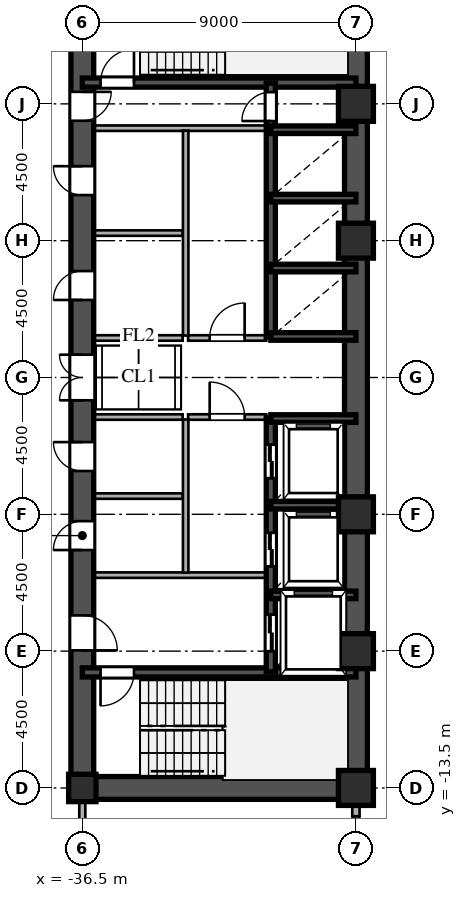
"""IFC4 building model, lengths in metres.
Left out: names, types, materials, properties, quantities, classifications, styles, units other than length and angle.
Written with IfcOpenShell. Run it as: python <this file> out.ifc"""

import sys

from ifc_helpers import new_model, si_unit, direction, frame, frame_2d, origin, origin_2d, place, context, subcontext, project, spatial, rectangle, hollow_rectangle, i_section, extrude, source, transform, mapped, element, fill, save


model = new_model("IFC4")
c1 = context("Model", 3, precision=1e-05, world=origin(), true_north=direction((0.0, 1.0)))
c2 = subcontext(c1, "Body", "Model", "MODEL_VIEW")
j1 = project(units=[si_unit("LENGTHUNIT", "METRE"), si_unit("PLANEANGLEUNIT", "RADIAN")], contexts=[c1])
p1 = place(None, origin())
s1 = spatial("IfcSite", under=j1, at=p1, CompositionType="ELEMENT")
p2 = place(p1, origin())
s2 = spatial("IfcBuilding", under=s1, at=p2, CompositionType="ELEMENT")
p3 = place(p2, frame((0.0, 0.0, 26.1)))
s3 = spatial("IfcBuildingStorey", under=s2, at=p3, CompositionType="ELEMENT", Elevation=26.1)
m1 = source(origin(), c2, "Body", "SweptSolid", [
    extrude(hollow_rectangle(XDim=1.15, YDim=1.15, WallThickness=0.048, at=origin_2d()), origin(), (0.0, 0.0, 1.0), 3.6),
])
for number, where, z_axis, x_axis in (
    (1, (-27.5, -13.5, 0.0), (0.0, 0.0, 1.0), (1.0, 0.0, 0.0)),
    (2, (-27.5, -9.0, 0.0), (0.0, 0.0, 1.0), (1.0, 0.0, 0.0)),
    (3, (-27.5, -4.5, 0.0), (0.0, 0.0, 1.0), (1.0, 0.0, 0.0)),
    (4, (-27.5, 4.5, 0.0), (0.0, 0.0, 1.0), (1.0, 0.0, 0.0)),
    (5, (-27.5, 9.0, 0.0), (0.0, 0.0, 1.0), (1.0, 0.0, 0.0)),
):
    element("IfcColumn", number, at=place(p3, frame(where, z_axis=z_axis, x_axis=x_axis)), inside=s3, PredefinedType="COLUMN", context=c2, shape_type="MappedRepresentation", body=[
        mapped(m1, transform((0.0, 0.0, 0.0), scale=1.0)),
    ])
m2 = source(origin(), c2, "Body", "SweptSolid", [
    extrude(i_section(OverallWidth=0.9, OverallDepth=0.9, WebThickness=0.036, FlangeThickness=0.055, at=origin_2d()), origin(), (0.0, 0.0, 1.0), 3.6),
])
p4 = place(p3, frame((-36.5, -13.5, 0.0), z_axis=(0.0, 0.0, 1.0), x_axis=(1.0, 0.0, 0.0)))
e6 = element("IfcColumn", 6, at=p4, inside=s3, PredefinedType="COLUMN", context=c2, shape_type="MappedRepresentation", body=[
    mapped(m2, transform((0.0, 0.0, 0.0), scale=1.0)),
])
p5 = place(p3, frame((-27.5, -14.43, 0.0), z_axis=(0.0, 0.0, 1.0), x_axis=(0.0, 1.0, 0.0)))
e7 = element("IfcWall", 7, at=p5, inside=s3, PredefinedType="SOLIDWALL", context=c2, shape_type="SweptSolid", body=[
    extrude(rectangle(XDim=0.55, YDim=0.24, at=frame_2d((0.275, 0.0))), origin(), (0.0, 0.0, 1.0), 2.88),
])
for number, where, z_axis, x_axis in (
    (8, (-27.5, -13.5, 0.0), (0.0, 0.0, 1.0), (0.0, 1.0, 0.0)),
    (9, (-27.5, 1.3, 0.0), (0.0, 0.0, 1.0), (0.0, 1.0, 0.0)),
):
    element("IfcWall", number, at=place(p3, frame(where, z_axis=z_axis, x_axis=x_axis)), inside=s3, PredefinedType="SHEAR", context=c2, shape_type="SweptSolid", body=[
        extrude(rectangle(XDim=12.2, YDim=0.75, at=frame_2d((6.1, 0.0))), origin(), (0.0, 0.0, 1.0), 3.38),
    ])
p6 = place(p3, frame((-27.5, -1.3, 0.0), z_axis=(0.0, 0.0, 1.0), x_axis=(0.0, 1.0, 0.0)))
e10 = element("IfcWall", 10, at=p6, inside=s3, PredefinedType="SHEAR", context=c2, shape_type="SweptSolid", body=[
    extrude(rectangle(XDim=2.6, YDim=0.75, at=frame_2d((1.3, 0.0))), origin(), (0.0, 0.0, 1.0), 3.38),
])
p7 = place(p3, frame((-36.5, -13.5, 0.0), z_axis=(0.0, 0.0, 1.0), x_axis=(1.0, 0.0, 0.0)))
e11 = element("IfcWall", 11, at=p7, inside=s3, PredefinedType="SHEAR", context=c2, shape_type="SweptSolid", body=[
    extrude(rectangle(XDim=9.0, YDim=0.75, at=frame_2d((4.5, 0.0))), origin(), (0.0, 0.0, 1.0), 3.38),
])
p8 = place(p3, frame((-36.5, -13.65, 0.0), z_axis=(0.0, 0.0, 1.0), x_axis=(0.0, 1.0, 0.0)))
e12 = element("IfcWall", 12, at=p8, inside=s3, PredefinedType="SHEAR", context=c2, shape_type="SweptSolid", body=[
    extrude(rectangle(XDim=7.15, YDim=0.75, at=frame_2d((3.575, 0.0))), origin(), (0.0, 0.0, 1.0), 3.38),
])
p9 = place(p8, frame((4.675, 0.0, 0.0)))
e13 = element("IfcOpeningElement", 13, at=p9, cuts=e12, PredefinedType="OPENING", context=c2, shape_type="SweptSolid", body=[
    extrude(rectangle(XDim=1.15, YDim=2.2, at=frame_2d((0.575, 1.1))), frame((0.0, 0.385, 0.0), z_axis=(0.0, -1.0, 0.0), x_axis=(1.0, 0.0, 0.0)), (0.0, 0.0, 1.0), 0.77),
])
p10 = place(p3, frame((-36.5, -1.3, 0.0), z_axis=(0.0, 0.0, 1.0), x_axis=(0.0, 1.0, 0.0)))
e14 = element("IfcWall", 14, at=p10, inside=s3, PredefinedType="SHEAR", context=c2, shape_type="SweptSolid", body=[
    extrude(rectangle(XDim=2.6, YDim=0.75, at=frame_2d((1.3, 0.0))), origin(), (0.0, 0.0, 1.0), 3.38),
])
p11 = place(p10, frame((0.55, 0.0, 0.0)))
e15 = element("IfcOpeningElement", 15, at=p11, cuts=e14, PredefinedType="OPENING", context=c2, shape_type="SweptSolid", body=[
    extrude(rectangle(XDim=1.5, YDim=2.3, at=frame_2d((0.75, 1.15))), frame((0.0, 0.385, 0.0), z_axis=(0.0, -1.0, 0.0), x_axis=(1.0, 0.0, 0.0)), (0.0, 0.0, 1.0), 0.77),
])
p12 = place(p3, frame((-36.5, 8.2, 0.0), z_axis=(0.0, 0.0, 1.0), x_axis=(0.0, 1.0, 0.0)))
e16 = element("IfcWall", 16, at=p12, inside=s3, PredefinedType="SHEAR", context=c2, shape_type="SweptSolid", body=[
    extrude(rectangle(XDim=5.45, YDim=0.75, at=frame_2d((2.725, 0.0))), origin(), (0.0, 0.0, 1.0), 3.38),
])
p13 = place(p12, frame((0.245, 0.0, 0.0)))
e17 = element("IfcOpeningElement", 17, at=p13, cuts=e16, PredefinedType="OPENING", context=c2, shape_type="SweptSolid", body=[
    extrude(rectangle(XDim=0.95, YDim=2.15, at=frame_2d((0.475, 1.075))), frame((0.0, 0.385, 0.0), z_axis=(0.0, -1.0, 0.0), x_axis=(1.0, 0.0, 0.0)), (0.0, 0.0, 1.0), 0.77),
])
p14 = place(p3, frame((-36.5, -6.5, 0.0), z_axis=(0.0, 0.0, 1.0), x_axis=(0.0, 1.0, 0.0)))
e18 = element("IfcWall", 18, at=p14, inside=s3, PredefinedType="SHEAR", context=c2, shape_type="SweptSolid", body=[
    extrude(rectangle(XDim=2.6, YDim=0.75, at=frame_2d((1.3, 0.0))), origin(), (0.0, 0.0, 1.0), 3.38),
])
p15 = place(p14, frame((0.825, 0.0, 0.0)))
e19 = element("IfcOpeningElement", 19, at=p15, cuts=e18, PredefinedType="OPENING", context=c2, shape_type="SweptSolid", body=[
    extrude(rectangle(XDim=0.95, YDim=2.15, at=frame_2d((0.475, 1.075))), frame((0.0, 0.385, 0.0), z_axis=(0.0, -1.0, 0.0), x_axis=(1.0, 0.0, 0.0)), (0.0, 0.0, 1.0), 0.77),
])
p16 = place(p3, frame((-36.5, -3.9, 0.0), z_axis=(0.0, 0.0, 1.0), x_axis=(0.0, 1.0, 0.0)))
e20 = element("IfcWall", 20, at=p16, inside=s3, PredefinedType="SHEAR", context=c2, shape_type="SweptSolid", body=[
    extrude(rectangle(XDim=2.6, YDim=0.75, at=frame_2d((1.3, 0.0))), origin(), (0.0, 0.0, 1.0), 3.38),
])
p17 = place(p16, frame((0.825, 0.0, 0.0)))
e21 = element("IfcOpeningElement", 21, at=p17, cuts=e20, PredefinedType="OPENING", context=c2, shape_type="SweptSolid", body=[
    extrude(rectangle(XDim=0.95, YDim=2.15, at=frame_2d((0.475, 1.075))), frame((0.0, 0.385, 0.0), z_axis=(0.0, -1.0, 0.0), x_axis=(1.0, 0.0, 0.0)), (0.0, 0.0, 1.0), 0.77),
])
p18 = place(p3, frame((-36.5, 1.3, 0.0), z_axis=(0.0, 0.0, 1.0), x_axis=(0.0, 1.0, 0.0)))
e22 = element("IfcWall", 22, at=p18, inside=s3, PredefinedType="SHEAR", context=c2, shape_type="SweptSolid", body=[
    extrude(rectangle(XDim=3.45, YDim=0.75, at=frame_2d((1.725, 0.0))), origin(), (0.0, 0.0, 1.0), 3.38),
])
p19 = place(p18, frame((1.25, 0.0, 0.0)))
e23 = element("IfcOpeningElement", 23, at=p19, cuts=e22, PredefinedType="OPENING", context=c2, shape_type="SweptSolid", body=[
    extrude(rectangle(XDim=0.95, YDim=2.15, at=frame_2d((0.475, 1.075))), frame((0.0, 0.385, 0.0), z_axis=(0.0, -1.0, 0.0), x_axis=(1.0, 0.0, 0.0)), (0.0, 0.0, 1.0), 0.77),
])
p20 = place(p3, frame((-36.5, 4.75, 0.0), z_axis=(0.0, 0.0, 1.0), x_axis=(0.0, 1.0, 0.0)))
e24 = element("IfcWall", 24, at=p20, inside=s3, PredefinedType="SHEAR", context=c2, shape_type="SweptSolid", body=[
    extrude(rectangle(XDim=3.45, YDim=0.75, at=frame_2d((1.725, 0.0))), origin(), (0.0, 0.0, 1.0), 3.38),
])
p21 = place(p20, frame((1.25, 0.0, 0.0)))
e25 = element("IfcOpeningElement", 25, at=p21, cuts=e24, PredefinedType="OPENING", context=c2, shape_type="SweptSolid", body=[
    extrude(rectangle(XDim=0.95, YDim=2.15, at=frame_2d((0.475, 1.075))), frame((0.0, 0.385, 0.0), z_axis=(0.0, -1.0, 0.0), x_axis=(1.0, 0.0, 0.0)), (0.0, 0.0, 1.0), 0.77),
])
p22 = place(p3, frame((-36.5, -9.7, 0.0), z_axis=(0.0, 0.0, 1.0), x_axis=(1.0, 0.0, 0.0)))
e26 = element("IfcWall", 26, at=p22, inside=s3, PredefinedType="SHEAR", context=c2, shape_type="SweptSolid", body=[
    extrude(rectangle(XDim=9.0, YDim=0.3, at=frame_2d((4.5, 0.0))), origin(), (0.0, 0.0, 1.0), 3.38),
])
p23 = place(p22, frame((0.6, 0.0, 0.0)))
e27 = element("IfcOpeningElement", 27, at=p23, cuts=e26, PredefinedType="OPENING", context=c2, shape_type="SweptSolid", body=[
    extrude(rectangle(XDim=1.1, YDim=2.2, at=frame_2d((0.55, 1.1))), frame((0.0, 0.16, 0.0), z_axis=(0.0, -1.0, 0.0), x_axis=(1.0, 0.0, 0.0)), (0.0, 0.0, 1.0), 0.32),
])
p24 = place(p3, frame((-36.5, 9.7, 0.0), z_axis=(0.0, 0.0, 1.0), x_axis=(1.0, 0.0, 0.0)))
e28 = element("IfcWall", 28, at=p24, inside=s3, PredefinedType="SHEAR", context=c2, shape_type="SweptSolid", body=[
    extrude(rectangle(XDim=9.0, YDim=0.3, at=frame_2d((4.5, 0.0))), origin(), (0.0, 0.0, 1.0), 3.38),
])
p25 = place(p24, frame((0.6, 0.0, 0.0)))
e29 = element("IfcOpeningElement", 29, at=p25, cuts=e28, PredefinedType="OPENING", context=c2, shape_type="SweptSolid", body=[
    extrude(rectangle(XDim=1.1, YDim=2.2, at=frame_2d((0.55, 1.1))), frame((0.0, 0.16, 0.0), z_axis=(0.0, -1.0, 0.0), x_axis=(1.0, 0.0, 0.0)), (0.0, 0.0, 1.0), 0.32),
])
for number, where, z_axis, x_axis in (
    (30, (-30.3, -7.15, 0.0), (0.0, 0.0, 1.0), (1.0, 0.0, 0.0)),
    (31, (-30.3, -4.2, 0.0), (0.0, 0.0, 1.0), (1.0, 0.0, 0.0)),
    (32, (-30.3, -1.35, 0.0), (0.0, 0.0, 1.0), (1.0, 0.0, 0.0)),
    (33, (-30.3, 1.35, 0.0), (0.0, 0.0, 1.0), (1.0, 0.0, 0.0)),
    (34, (-30.3, 3.6, 0.0), (0.0, 0.0, 1.0), (1.0, 0.0, 0.0)),
    (35, (-30.3, 5.9, 0.0), (0.0, 0.0, 1.0), (1.0, 0.0, 0.0)),
    (36, (-30.3, 8.15, 0.0), (0.0, 0.0, 1.0), (1.0, 0.0, 0.0)),
):
    element("IfcWall", number, at=place(p3, frame(where, z_axis=z_axis, x_axis=x_axis)), inside=s3, PredefinedType="SHEAR", context=c2, shape_type="SweptSolid", body=[
        extrude(rectangle(XDim=2.8, YDim=0.25, at=frame_2d((1.4, 0.0))), origin(), (0.0, 0.0, 1.0), 3.38),
    ])
p26 = place(p3, frame((-30.3, -9.68, 0.0), z_axis=(0.0, 0.0, 1.0), x_axis=(0.0, 1.0, 0.0)))
e37 = element("IfcWall", 37, at=p26, inside=s3, PredefinedType="SHEAR", context=c2, shape_type="SweptSolid", body=[
    extrude(rectangle(XDim=2.56, YDim=0.3, at=frame_2d((1.28, 0.0))), origin(), (0.0, 0.0, 1.0), 3.38),
])
p27 = place(p26, frame((0.68, 0.0, 0.0)))
e38 = element("IfcOpeningElement", 38, at=p27, cuts=e37, PredefinedType="OPENING", context=c2, shape_type="SweptSolid", body=[
    extrude(rectangle(XDim=1.2, YDim=2.25, at=frame_2d((0.6, 1.125))), frame((0.0, 0.16, 0.0), z_axis=(0.0, -1.0, 0.0), x_axis=(1.0, 0.0, 0.0)), (0.0, 0.0, 1.0), 0.32),
])
p28 = place(p3, frame((-30.3, -7.12, 0.0), z_axis=(0.0, 0.0, 1.0), x_axis=(0.0, 1.0, 0.0)))
e39 = element("IfcWall", 39, at=p28, inside=s3, PredefinedType="SHEAR", context=c2, shape_type="SweptSolid", body=[
    extrude(rectangle(XDim=2.92, YDim=0.3, at=frame_2d((1.46, 0.0))), origin(), (0.0, 0.0, 1.0), 3.38),
])
p29 = place(p28, frame((0.91, 0.0, 0.0)))
e40 = element("IfcOpeningElement", 40, at=p29, cuts=e39, PredefinedType="OPENING", context=c2, shape_type="SweptSolid", body=[
    extrude(rectangle(XDim=1.1, YDim=2.2, at=frame_2d((0.55, 1.1))), frame((0.0, 0.16, 0.0), z_axis=(0.0, -1.0, 0.0), x_axis=(1.0, 0.0, 0.0)), (0.0, 0.0, 1.0), 0.32),
])
p30 = place(p3, frame((-30.3, -4.2, 0.0), z_axis=(0.0, 0.0, 1.0), x_axis=(0.0, 1.0, 0.0)))
e41 = element("IfcWall", 41, at=p30, inside=s3, PredefinedType="SHEAR", context=c2, shape_type="SweptSolid", body=[
    extrude(rectangle(XDim=2.88, YDim=0.3, at=frame_2d((1.44, 0.0))), origin(), (0.0, 0.0, 1.0), 3.38),
])
p31 = place(p30, frame((0.89, 0.0, 0.0)))
e42 = element("IfcOpeningElement", 42, at=p31, cuts=e41, PredefinedType="OPENING", context=c2, shape_type="SweptSolid", body=[
    extrude(rectangle(XDim=1.1, YDim=2.2, at=frame_2d((0.55, 1.1))), frame((0.0, 0.16, 0.0), z_axis=(0.0, -1.0, 0.0), x_axis=(1.0, 0.0, 0.0)), (0.0, 0.0, 1.0), 0.32),
])
p32 = place(p3, frame((-30.3, 1.32, 0.0), z_axis=(0.0, 0.0, 1.0), x_axis=(0.0, 1.0, 0.0)))
e43 = element("IfcWall", 43, at=p32, inside=s3, PredefinedType="SHEAR", context=c2, shape_type="SweptSolid", body=[
    extrude(rectangle(XDim=2.28, YDim=0.3, at=frame_2d((1.14, 0.0))), origin(), (0.0, 0.0, 1.0), 3.38),
])
p33 = place(p3, frame((-30.3, 3.6, 0.0), z_axis=(0.0, 0.0, 1.0), x_axis=(0.0, 1.0, 0.0)))
e44 = element("IfcWall", 44, at=p33, inside=s3, PredefinedType="SHEAR", context=c2, shape_type="SweptSolid", body=[
    extrude(rectangle(XDim=2.3, YDim=0.3, at=frame_2d((1.15, 0.0))), origin(), (0.0, 0.0, 1.0), 3.38),
])
p34 = place(p3, frame((-30.3, 5.9, 0.0), z_axis=(0.0, 0.0, 1.0), x_axis=(0.0, 1.0, 0.0)))
e45 = element("IfcWall", 45, at=p34, inside=s3, PredefinedType="SHEAR", context=c2, shape_type="SweptSolid", body=[
    extrude(rectangle(XDim=2.25, YDim=0.3, at=frame_2d((1.125, 0.0))), origin(), (0.0, 0.0, 1.0), 3.38),
])
p35 = place(p3, frame((-30.3, 8.15, 0.0), z_axis=(0.0, 0.0, 1.0), x_axis=(0.0, 1.0, 0.0)))
e46 = element("IfcWall", 46, at=p35, inside=s3, PredefinedType="SHEAR", context=c2, shape_type="SweptSolid", body=[
    extrude(rectangle(XDim=1.53, YDim=0.3, at=frame_2d((0.765, 0.0))), origin(), (0.0, 0.0, 1.0), 3.38),
])
p36 = place(p35, frame((0.285, 0.0, 0.0)))
e47 = element("IfcOpeningElement", 47, at=p36, cuts=e46, PredefinedType="OPENING", context=c2, shape_type="SweptSolid", body=[
    extrude(rectangle(XDim=0.95, YDim=2.15, at=frame_2d((0.475, 1.075))), frame((0.0, 0.16, 0.0), z_axis=(0.0, -1.0, 0.0), x_axis=(1.0, 0.0, 0.0)), (0.0, 0.0, 1.0), 0.32),
])
for number, where, z_axis, x_axis in (
    (48, (-36.15, -6.5, 0.0), (0.0, 0.0, 1.0), (1.0, 0.0, 0.0)),
    (49, (-36.15, 8.2, 0.0), (0.0, 0.0, 1.0), (1.0, 0.0, 0.0)),
):
    element("IfcWall", number, at=place(p3, frame(where, z_axis=z_axis, x_axis=x_axis)), inside=s3, PredefinedType="PARTITIONING", context=c2, shape_type="SweptSolid", body=[
        extrude(rectangle(XDim=5.7, YDim=0.18, at=frame_2d((2.85, 0.0))), origin(), (0.0, 0.0, 1.0), 3.38),
    ])
p37 = place(p3, frame((-33.1, -6.42, 0.0), z_axis=(0.0, 0.0, 1.0), x_axis=(0.0, 1.0, 0.0)))
e50 = element("IfcWall", 50, at=p37, inside=s3, PredefinedType="PARTITIONING", context=c2, shape_type="SweptSolid", body=[
    extrude(rectangle(XDim=5.04, YDim=0.18, at=frame_2d((2.52, 0.0))), origin(), (0.0, 0.0, 1.0), 3.38),
])
p38 = place(p3, frame((-33.1, 1.38, 0.0), z_axis=(0.0, 0.0, 1.0), x_axis=(0.0, 1.0, 0.0)))
e51 = element("IfcWall", 51, at=p38, inside=s3, PredefinedType="PARTITIONING", context=c2, shape_type="SweptSolid", body=[
    extrude(rectangle(XDim=6.74, YDim=0.18, at=frame_2d((3.37, 0.0))), origin(), (0.0, 0.0, 1.0), 3.38),
])
p39 = place(p3, frame((-33.02, -1.3, 0.0), z_axis=(0.0, 0.0, 1.0), x_axis=(1.0, 0.0, 0.0)))
e52 = element("IfcWall", 52, at=p39, inside=s3, PredefinedType="PARTITIONING", context=c2, shape_type="SweptSolid", body=[
    extrude(rectangle(XDim=2.57, YDim=0.18, at=frame_2d((1.285, 0.0))), origin(), (0.0, 0.0, 1.0), 3.38),
])
p40 = place(p39, frame((0.71, 0.0, 0.0)))
e53 = element("IfcOpeningElement", 53, at=p40, cuts=e52, PredefinedType="OPENING", context=c2, shape_type="SweptSolid", body=[
    extrude(rectangle(XDim=1.15, YDim=2.2, at=frame_2d((0.575, 1.1))), frame((0.0, 0.1, 0.0), z_axis=(0.0, -1.0, 0.0), x_axis=(1.0, 0.0, 0.0)), (0.0, 0.0, 1.0), 0.2),
])
p41 = place(p3, frame((-33.02, 1.3, 0.0), z_axis=(0.0, 0.0, 1.0), x_axis=(1.0, 0.0, 0.0)))
e54 = element("IfcWall", 54, at=p41, inside=s3, PredefinedType="PARTITIONING", context=c2, shape_type="SweptSolid", body=[
    extrude(rectangle(XDim=2.57, YDim=0.18, at=frame_2d((1.285, 0.0))), origin(), (0.0, 0.0, 1.0), 3.38),
])
p42 = place(p41, frame((0.71, 0.0, 0.0)))
e55 = element("IfcOpeningElement", 55, at=p42, cuts=e54, PredefinedType="OPENING", context=c2, shape_type="SweptSolid", body=[
    extrude(rectangle(XDim=1.15, YDim=2.2, at=frame_2d((0.575, 1.1))), frame((0.0, 0.1, 0.0), z_axis=(0.0, -1.0, 0.0), x_axis=(1.0, 0.0, 0.0)), (0.0, 0.0, 1.0), 0.2),
])
for number, where, z_axis, x_axis in (
    (56, (-36.15, -1.3, 0.0), (0.0, 0.0, 1.0), (1.0, 0.0, 0.0)),
    (57, (-36.15, 1.3, 0.0), (0.0, 0.0, 1.0), (1.0, 0.0, 0.0)),
    (58, (-36.15, -3.9, 0.0), (0.0, 0.0, 1.0), (1.0, 0.0, 0.0)),
    (59, (-36.15, 4.75, 0.0), (0.0, 0.0, 1.0), (1.0, 0.0, 0.0)),
):
    element("IfcWall", number, at=place(p3, frame(where, z_axis=z_axis, x_axis=x_axis)), inside=s3, PredefinedType="PARTITIONING", context=c2, shape_type="SweptSolid", body=[
        extrude(rectangle(XDim=2.95, YDim=0.18, at=frame_2d((1.475, 0.0))), origin(), (0.0, 0.0, 1.0), 3.38),
    ])
p43 = place(p3, frame((-36.5, -15.515, 0.0), z_axis=(0.0, 0.0, 1.0), x_axis=(0.0, 1.0, 0.0)))
e60 = element("IfcWall", 60, at=p43, inside=s3, PredefinedType="PARTITIONING", context=c2, shape_type="SweptSolid", body=[
    extrude(rectangle(XDim=1.635, YDim=0.2, at=frame_2d((0.817, 0.0))), origin(), (0.0, 0.0, 1.0), 2.68),
])
m3 = source(origin(), c2, "Body", "SweptSolid", [
    extrude(rectangle(XDim=1.15, YDim=2.2, at=frame_2d((0.575, 1.1))), frame((0.0, 0.025, 0.0), z_axis=(0.0, -1.0, 0.0), x_axis=(1.0, 0.0, 0.0)), (0.0, 0.0, 1.0), 0.05),
])
p44 = place(p9, frame((1.15, 0.0, 0.0), z_axis=(0.0, 0.0, 1.0), x_axis=(-1.0, 0.0, 0.0)))
e61 = element("IfcDoor", 61, at=p44, inside=s3, OperationType="SINGLE_SWING_LEFT", PredefinedType="DOOR", context=c2, shape_type="MappedRepresentation", body=[
    mapped(m3, transform((0.0, 0.0, 0.0), scale=1.0)),
])
fill(e13, e61)
m4 = source(origin(), c2, "Body", "SweptSolid", [
    extrude(rectangle(XDim=1.5, YDim=2.3, at=frame_2d((0.75, 1.15))), frame((0.0, 0.025, 0.0), z_axis=(0.0, -1.0, 0.0), x_axis=(1.0, 0.0, 0.0)), (0.0, 0.0, 1.0), 0.05),
])
p45 = place(p11, origin())
e62 = element("IfcDoor", 62, at=p45, inside=s3, OperationType="DOUBLE_SWING_LEFT", PredefinedType="DOOR", context=c2, shape_type="MappedRepresentation", body=[
    mapped(m4, transform((0.0, 0.0, 0.0), scale=1.0)),
])
fill(e15, e62)
m5 = source(origin(), c2, "Body", "SweptSolid", [
    extrude(rectangle(XDim=0.95, YDim=2.15, at=frame_2d((0.475, 1.075))), frame((0.0, 0.025, 0.0), z_axis=(0.0, -1.0, 0.0), x_axis=(1.0, 0.0, 0.0)), (0.0, 0.0, 1.0), 0.05),
])
p46 = place(p13, frame((0.95, 0.0, 0.0), z_axis=(0.0, 0.0, 1.0), x_axis=(-1.0, 0.0, 0.0)))
e63 = element("IfcDoor", 63, at=p46, inside=s3, OperationType="SINGLE_SWING_RIGHT", PredefinedType="DOOR", context=c2, shape_type="MappedRepresentation", body=[
    mapped(m5, transform((0.0, 0.0, 0.0), scale=1.0)),
])
fill(e17, e63)
p47 = place(p15, origin())
e64 = element("IfcDoor", 64, at=p47, inside=s3, OperationType="SINGLE_SWING_LEFT", PredefinedType="DOOR", context=c2, shape_type="MappedRepresentation", body=[
    mapped(m5, transform((0.0, 0.0, 0.0), scale=1.0)),
])
fill(e19, e64)
p48 = place(p17, origin())
e65 = element("IfcDoor", 65, at=p48, inside=s3, OperationType="SINGLE_SWING_RIGHT", PredefinedType="DOOR", context=c2, shape_type="MappedRepresentation", body=[
    mapped(m5, transform((0.0, 0.0, 0.0), scale=1.0)),
])
fill(e21, e65)
p49 = place(p19, origin())
e66 = element("IfcDoor", 66, at=p49, inside=s3, OperationType="SINGLE_SWING_LEFT", PredefinedType="DOOR", context=c2, shape_type="MappedRepresentation", body=[
    mapped(m5, transform((0.0, 0.0, 0.0), scale=1.0)),
])
fill(e23, e66)
p50 = place(p21, origin())
e67 = element("IfcDoor", 67, at=p50, inside=s3, OperationType="SINGLE_SWING_RIGHT", PredefinedType="DOOR", context=c2, shape_type="MappedRepresentation", body=[
    mapped(m5, transform((0.0, 0.0, 0.0), scale=1.0)),
])
fill(e25, e67)
m6 = source(origin(), c2, "Body", "SweptSolid", [
    extrude(rectangle(XDim=1.1, YDim=2.2, at=frame_2d((0.55, 1.1))), frame((0.0, 0.025, 0.0), z_axis=(0.0, -1.0, 0.0), x_axis=(1.0, 0.0, 0.0)), (0.0, 0.0, 1.0), 0.05),
])
p51 = place(p23, frame((1.1, 0.0, 0.0), z_axis=(0.0, 0.0, 1.0), x_axis=(-1.0, 0.0, 0.0)))
e68 = element("IfcDoor", 68, at=p51, inside=s3, OperationType="SINGLE_SWING_LEFT", PredefinedType="DOOR", context=c2, shape_type="MappedRepresentation", body=[
    mapped(m6, transform((0.0, 0.0, 0.0), scale=1.0)),
])
fill(e27, e68)
p52 = place(p25, origin())
e69 = element("IfcDoor", 69, at=p52, inside=s3, OperationType="SINGLE_SWING_RIGHT", PredefinedType="DOOR", context=c2, shape_type="MappedRepresentation", body=[
    mapped(m6, transform((0.0, 0.0, 0.0), scale=1.0)),
])
fill(e29, e69)
m7 = source(origin(), c2, "Body", "SweptSolid", [
    extrude(rectangle(XDim=1.2, YDim=2.25, at=frame_2d((0.6, 1.125))), frame((0.0, 0.025, 0.0), z_axis=(0.0, -1.0, 0.0), x_axis=(1.0, 0.0, 0.0)), (0.0, 0.0, 1.0), 0.05),
])
p53 = place(p27, origin())
e70 = element("IfcDoor", 70, at=p53, inside=s3, OperationType="DOUBLE_DOOR_SLIDING", PredefinedType="DOOR", context=c2, shape_type="MappedRepresentation", body=[
    mapped(m7, transform((0.0, 0.0, 0.0), scale=1.0)),
])
fill(e38, e70)
m8 = source(origin(), c2, "Body", "SweptSolid", [
    extrude(rectangle(XDim=1.1, YDim=2.2, at=frame_2d((0.55, 1.1))), frame((0.0, 0.025, 0.0), z_axis=(0.0, -1.0, 0.0), x_axis=(1.0, 0.0, 0.0)), (0.0, 0.0, 1.0), 0.05),
])
p54 = place(p29, origin())
e71 = element("IfcDoor", 71, at=p54, inside=s3, OperationType="DOUBLE_DOOR_SLIDING", PredefinedType="DOOR", context=c2, shape_type="MappedRepresentation", body=[
    mapped(m8, transform((0.0, 0.0, 0.0), scale=1.0)),
])
fill(e40, e71)
p55 = place(p31, origin())
e72 = element("IfcDoor", 72, at=p55, inside=s3, OperationType="DOUBLE_DOOR_SLIDING", PredefinedType="DOOR", context=c2, shape_type="MappedRepresentation", body=[
    mapped(m8, transform((0.0, 0.0, 0.0), scale=1.0)),
])
fill(e42, e72)
p56 = place(p36, origin())
e73 = element("IfcDoor", 73, at=p56, inside=s3, OperationType="SINGLE_SWING_LEFT", PredefinedType="DOOR", context=c2, shape_type="MappedRepresentation", body=[
    mapped(m5, transform((0.0, 0.0, 0.0), scale=1.0)),
])
fill(e47, e73)
p57 = place(p40, origin())
e74 = element("IfcDoor", 74, at=p57, inside=s3, OperationType="SINGLE_SWING_LEFT", PredefinedType="DOOR", context=c2, shape_type="MappedRepresentation", body=[
    mapped(m3, transform((0.0, 0.0, 0.0), scale=1.0)),
])
fill(e53, e74)
p58 = place(p42, origin())
e75 = element("IfcDoor", 75, at=p58, inside=s3, OperationType="SINGLE_SWING_RIGHT", PredefinedType="DOOR", context=c2, shape_type="MappedRepresentation", body=[
    mapped(m3, transform((0.0, 0.0, 0.0), scale=1.0)),
])
fill(e55, e75)
save(model, sys.argv[1])
